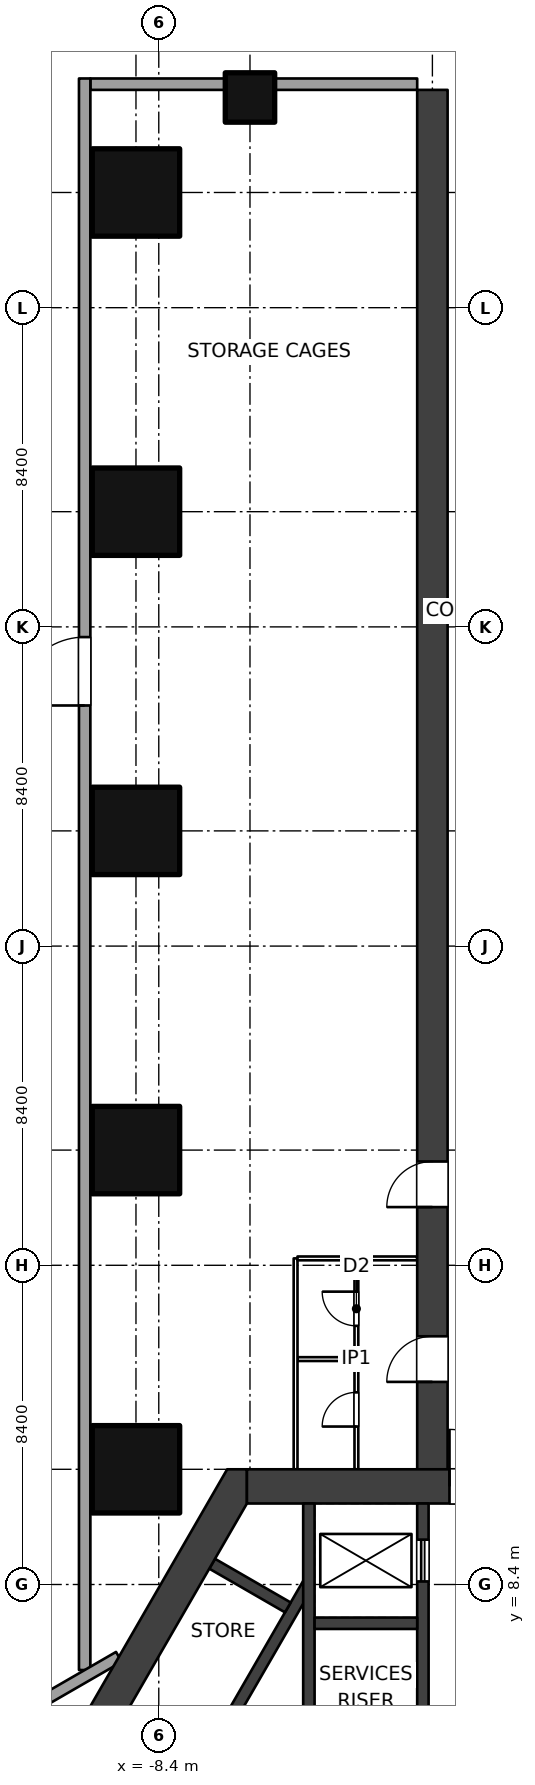
"""IFC4 building model, lengths in metres.
Left out: names, types, materials, properties, quantities, classifications, styles, units other than length and angle.
Written with IfcOpenShell. Run it as: python <this file> out.ifc"""

import sys

from ifc_helpers import new_model, si_unit, direction, frame, frame_2d, origin, origin_2d, place, context, subcontext, project, spatial, polyline, rectangle, outline, extrude, element, fill, save


model = new_model("IFC4")
c1 = context("Model", 3, precision=1e-05, world=origin(), true_north=direction((0.0, 1.0)))
c2 = subcontext(c1, "Body", "Model", "MODEL_VIEW")
j1 = project(units=[si_unit("LENGTHUNIT", "METRE"), si_unit("PLANEANGLEUNIT", "RADIAN")], contexts=[c1])
p1 = place(None, origin())
s1 = spatial("IfcSite", under=j1, at=p1, CompositionType="ELEMENT")
p2 = place(p1, origin())
s2 = spatial("IfcBuilding", under=s1, at=p2, CompositionType="ELEMENT")
p3 = place(p2, frame((0.0, 0.0, -7.0)))
s3 = spatial("IfcBuildingStorey", under=s2, at=p3, CompositionType="ELEMENT", Elevation=-7.0)
for number, where, z_axis, x_axis in (
    (1, (-9.0, 11.432, 0.0), (0.0, 0.0, 1.0), (1.0, 0.0, 0.0)),
    (2, (-9.0, 19.832, 0.0), (0.0, 0.0, 1.0), (1.0, 0.0, 0.0)),
    (3, (-9.0, 28.231, 0.0), (0.0, 0.0, 1.0), (1.0, 0.0, 0.0)),
    (4, (-9.0, 36.632, 0.0), (0.0, 0.0, 1.0), (1.0, 0.0, 0.0)),
    (5, (-9.0, 45.031, 0.0), (0.0, 0.0, 1.0), (1.0, 0.0, 0.0)),
):
    element("IfcColumn", number, at=place(p3, frame(where, z_axis=z_axis, x_axis=x_axis)), inside=s3, PredefinedType="COLUMN", context=c2, shape_type="SweptSolid", body=[
        extrude(rectangle(XDim=2.3, YDim=2.3, at=origin_2d()), origin(), (0.0, 0.0, 1.0), 3.5),
    ])
p4 = place(p3, frame((-6.0, 47.531, 0.0), z_axis=(0.0, 0.0, 1.0), x_axis=(1.0, 0.0, 0.0)))
e6 = element("IfcColumn", 6, at=p4, inside=s3, PredefinedType="COLUMN", context=c2, shape_type="SweptSolid", body=[
    extrude(rectangle(XDim=1.3, YDim=1.3, at=origin_2d()), origin(), (0.0, 0.0, 1.0), 3.5),
])
p5 = place(p3, frame((-6.08, 10.981, 0.0), z_axis=(0.0, 0.0, 1.0), x_axis=(1.0, 0.0, 0.0)))
e7 = element("IfcWall", 7, at=p5, inside=s3, PredefinedType="SHEAR", context=c2, shape_type="SweptSolid", body=[
    extrude(rectangle(XDim=12.161, YDim=0.9, at=frame_2d((6.08, 0.0))), origin(), (0.0, 0.0, 1.0), 3.5),
])
p6 = place(p5, frame((5.33, 0.0, 0.0)))
e8 = element("IfcOpeningElement", 8, at=p6, cuts=e7, PredefinedType="OPENING", context=c2, shape_type="SweptSolid", body=[
    extrude(rectangle(XDim=1.5, YDim=2.1, at=frame_2d((0.75, 1.05))), frame((0.0, 0.46, 0.0), z_axis=(0.0, -1.0, 0.0), x_axis=(1.0, 0.0, 0.0)), (0.0, 0.0, 1.0), 0.92),
])
p7 = place(p3, origin())
e9 = element("IfcWall", 9, at=p7, inside=s3, PredefinedType="SHEAR", context=c2, shape_type="SweptSolid", body=[
    extrude(outline(polyline([(-6.6, 11.432), (-13.2, 0.0), (-12.94, -0.45), (-12.161, 0.0), (-6.08, 10.531), (-6.08, 11.432), (-6.6, 11.432)])), origin(), (0.0, 0.0, 1.0), 3.5),
])
p8 = place(p3, frame((-1.45, 3.63, 0.0), z_axis=(0.0, 0.0, 1.0), x_axis=(0.0, 1.0, 0.0)))
e10 = element("IfcWall", 10, at=p8, inside=s3, PredefinedType="SHEAR", context=c2, shape_type="SweptSolid", body=[
    extrude(rectangle(XDim=6.902, YDim=0.3, at=frame_2d((3.451, 0.0))), origin(), (0.0, 0.0, 1.0), 3.5),
])
p9 = place(p8, frame((4.85, 0.0, 0.0)))
e11 = element("IfcOpeningElement", 11, at=p9, cuts=e10, PredefinedType="OPENING", context=c2, shape_type="SweptSolid", body=[
    extrude(rectangle(XDim=1.1, YDim=2.1, at=frame_2d((0.55, 1.05))), frame((0.0, 0.16, 0.0), z_axis=(0.0, -1.0, 0.0), x_axis=(1.0, 0.0, 0.0)), (0.0, 0.0, 1.0), 0.32),
])
p10 = place(p3, frame((-4.45, 3.63, 0.0), z_axis=(0.0, 0.0, 1.0), x_axis=(0.0, 1.0, 0.0)))
e12 = element("IfcWall", 12, at=p10, inside=s3, PredefinedType="SHEAR", context=c2, shape_type="SweptSolid", body=[
    extrude(rectangle(XDim=6.902, YDim=0.3, at=frame_2d((3.451, 0.0))), origin(), (0.0, 0.0, 1.0), 3.5),
])
p11 = place(p3, frame((-4.3, 7.38, 0.0), z_axis=(0.0, 0.0, 1.0), x_axis=(1.0, 0.0, 0.0)))
e13 = element("IfcWall", 13, at=p11, inside=s3, PredefinedType="SHEAR", context=c2, shape_type="SweptSolid", body=[
    extrude(rectangle(XDim=2.7, YDim=0.3, at=frame_2d((1.35, 0.0))), origin(), (0.0, 0.0, 1.0), 3.5),
])
p12 = place(p3, frame((-9.548, -0.374, 0.0), z_axis=(0.0, 0.0, 1.0), x_axis=(0.500002290144, 0.866024081565, 0.0)))
e14 = element("IfcWall", 14, at=p12, inside=s3, PredefinedType="SHEAR", context=c2, shape_type="SweptSolid", body=[
    extrude(rectangle(XDim=10.195, YDim=0.3, at=frame_2d((5.098, 0.0))), origin(), (0.0, 0.0, 1.0), 3.5),
])
p13 = place(p12, frame((4.648, 0.0, 0.0)))
e15 = element("IfcOpeningElement", 15, at=p13, cuts=e14, PredefinedType="OPENING", context=c2, shape_type="SweptSolid", body=[
    extrude(rectangle(XDim=0.9, YDim=2.1, at=frame_2d((0.45, 1.05))), frame((0.0, 0.16, 0.0), z_axis=(0.0, -1.0, 0.0), x_axis=(1.0, 0.0, 0.0)), (0.0, 0.0, 1.0), 0.32),
])
p14 = place(p3, frame((-5.004, 7.796, 0.0), z_axis=(0.0, 0.0, 1.0), x_axis=(-0.866053019151, 0.499952165731, 0.0)))
e16 = element("IfcWall", 16, at=p14, inside=s3, PredefinedType="SHEAR", context=c2, shape_type="SweptSolid", body=[
    extrude(rectangle(XDim=2.3, YDim=0.3, at=frame_2d((1.15, 0.0))), origin(), (0.0, 0.0, 1.0), 3.5),
])
p15 = place(p3, frame((-1.2, 10.981, 0.0), z_axis=(0.0, 0.0, 1.0), x_axis=(0.0, 1.0, 0.0)))
e17 = element("IfcWall", 17, at=p15, inside=s3, PredefinedType="SHEAR", context=c2, shape_type="SweptSolid", body=[
    extrude(rectangle(XDim=36.75, YDim=0.8, at=frame_2d((18.375, 0.0))), origin(), (0.0, 0.0, 1.0), 3.5),
])
p16 = place(p15, frame((2.75, 0.0, 0.0)))
e18 = element("IfcOpeningElement", 18, at=p16, cuts=e17, PredefinedType="OPENING", context=c2, shape_type="SweptSolid", body=[
    extrude(rectangle(XDim=1.2, YDim=2.1, at=frame_2d((0.6, 1.05))), frame((0.0, 0.41, 0.0), z_axis=(0.0, -1.0, 0.0), x_axis=(1.0, 0.0, 0.0)), (0.0, 0.0, 1.0), 0.82),
])
p17 = place(p15, frame((7.35, 0.0, 0.0)))
e19 = element("IfcOpeningElement", 19, at=p17, cuts=e17, PredefinedType="OPENING", context=c2, shape_type="SweptSolid", body=[
    extrude(rectangle(XDim=1.2, YDim=2.1, at=frame_2d((0.6, 1.05))), frame((0.0, 0.41, 0.0), z_axis=(0.0, -1.0, 0.0), x_axis=(1.0, 0.0, 0.0)), (0.0, 0.0, 1.0), 0.82),
])
p18 = place(p3, frame((-3.2, 11.432, 0.0), z_axis=(0.0, 0.0, 1.0), x_axis=(0.0, 1.0, 0.0)))
e20 = element("IfcWall", 20, at=p18, inside=s3, PredefinedType="PARTITIONING", context=c2, shape_type="SweptSolid", body=[
    extrude(rectangle(XDim=5.6, YDim=0.1, at=frame_2d((2.8, 0.0))), origin(), (0.0, 0.0, 1.0), 3.2),
])
p19 = place(p18, frame((1.125, 0.0, 0.0)))
e21 = element("IfcOpeningElement", 21, at=p19, cuts=e20, PredefinedType="OPENING", context=c2, shape_type="SweptSolid", body=[
    extrude(rectangle(XDim=0.9, YDim=2.1, at=frame_2d((0.45, 1.05))), frame((0.0, 0.06, 0.0), z_axis=(0.0, -1.0, 0.0), x_axis=(1.0, 0.0, 0.0)), (0.0, 0.0, 1.0), 0.12),
])
p20 = place(p18, frame((3.775, 0.0, 0.0)))
e22 = element("IfcOpeningElement", 22, at=p20, cuts=e20, PredefinedType="OPENING", context=c2, shape_type="SweptSolid", body=[
    extrude(rectangle(XDim=0.9, YDim=2.1, at=frame_2d((0.45, 1.05))), frame((0.0, 0.06, 0.0), z_axis=(0.0, -1.0, 0.0), x_axis=(1.0, 0.0, 0.0)), (0.0, 0.0, 1.0), 0.12),
])
p21 = place(p3, frame((-3.25, 14.332, 0.0), z_axis=(0.0, 0.0, 1.0), x_axis=(-1.0, 0.0, 0.0)))
e23 = element("IfcWall", 23, at=p21, inside=s3, PredefinedType="PARTITIONING", context=c2, shape_type="SweptSolid", body=[
    extrude(rectangle(XDim=1.5, YDim=0.1, at=frame_2d((0.75, 0.0))), origin(), (0.0, 0.0, 1.0), 3.2),
])
p22 = place(p3, frame((-4.8, 11.432, 0.0), z_axis=(0.0, 0.0, 1.0), x_axis=(0.0, 1.0, 0.0)))
e24 = element("IfcWall", 24, at=p22, inside=s3, PredefinedType="PARTITIONING", context=c2, shape_type="SweptSolid", body=[
    extrude(rectangle(XDim=5.55, YDim=0.1, at=frame_2d((2.775, 0.0))), origin(), (0.0, 0.0, 1.0), 3.2),
])
p23 = place(p3, frame((-1.6, 16.981, 0.0), z_axis=(0.0, 0.0, 1.0), x_axis=(-1.0, 0.0, 0.0)))
e25 = element("IfcWall", 25, at=p23, inside=s3, PredefinedType="PARTITIONING", context=c2, shape_type="SweptSolid", body=[
    extrude(rectangle(XDim=3.15, YDim=0.1, at=frame_2d((1.575, 0.0))), origin(), (0.0, 0.0, 1.0), 3.2),
])
p24 = place(p3, frame((-1.6, 47.882, 0.0), z_axis=(0.0, 0.0, 1.0), x_axis=(-1.0, 0.0, 0.0)))
e26 = element("IfcWall", 26, at=p24, inside=s3, PredefinedType="SOLIDWALL", context=c2, shape_type="SweptSolid", body=[
    extrude(rectangle(XDim=8.6, YDim=0.3, at=frame_2d((4.3, 0.0))), origin(), (0.0, 0.0, 1.0), 1.9),
])
p25 = place(p3, frame((-10.35, 6.149, 0.0), z_axis=(0.0, 0.0, 1.0), x_axis=(0.0, 1.0, 0.0)))
e27 = element("IfcWall", 27, at=p25, inside=s3, PredefinedType="SOLIDWALL", context=c2, shape_type="SweptSolid", body=[
    extrude(rectangle(XDim=41.883, YDim=0.3, at=frame_2d((20.941, 0.0))), origin(), (0.0, 0.0, 1.0), 3.2),
])
p26 = place(p25, frame((25.383, 0.0, 0.0)))
e28 = element("IfcOpeningElement", 28, at=p26, cuts=e27, PredefinedType="OPENING", context=c2, shape_type="SweptSolid", body=[
    extrude(rectangle(XDim=1.8, YDim=2.4, at=frame_2d((0.9, 1.2))), frame((0.0, 0.16, 0.0), z_axis=(0.0, -1.0, 0.0), x_axis=(1.0, 0.0, 0.0)), (0.0, 0.0, 1.0), 0.32),
])
p27 = place(p3, frame((-9.45, 6.495, 0.0), z_axis=(0.0, 0.0, 1.0), x_axis=(-0.866025301493, -0.500000177174, 0.0)))
e29 = element("IfcWall", 29, at=p27, inside=s3, PredefinedType="SOLIDWALL", context=c2, shape_type="SweptSolid", body=[
    extrude(rectangle(XDim=43.095, YDim=0.3, at=frame_2d((21.548, 0.0))), origin(), (0.0, 0.0, 1.0), 3.2),
])
p28 = place(p27, frame((26.595, 0.0, 0.0)))
e30 = element("IfcOpeningElement", 30, at=p28, cuts=e29, PredefinedType="OPENING", context=c2, shape_type="SweptSolid", body=[
    extrude(rectangle(XDim=1.8, YDim=2.4, at=frame_2d((0.9, 1.2))), frame((0.0, 0.16, 0.0), z_axis=(0.0, -1.0, 0.0), x_axis=(1.0, 0.0, 0.0)), (0.0, 0.0, 1.0), 0.32),
])
p29 = place(p9, origin())
e31 = element("IfcDoor", 31, at=p29, inside=s3, OperationType="DOUBLE_DOOR_SLIDING", PredefinedType="DOOR", context=c2, shape_type="SweptSolid", body=[
    extrude(rectangle(XDim=1.1, YDim=2.1, at=frame_2d((0.55, 1.05))), frame((0.0, 0.025, 0.0), z_axis=(0.0, -1.0, 0.0), x_axis=(1.0, 0.0, 0.0)), (0.0, 0.0, 1.0), 0.05),
])
fill(e11, e31)
p30 = place(p6, origin())
e32 = element("IfcDoor", 32, at=p30, inside=s3, OperationType="DOUBLE_DOOR_DOUBLE_SWING", PredefinedType="DOOR", context=c2, shape_type="SweptSolid", body=[
    extrude(rectangle(XDim=1.5, YDim=2.1, at=frame_2d((0.75, 1.05))), frame((0.0, 0.025, 0.0), z_axis=(0.0, -1.0, 0.0), x_axis=(1.0, 0.0, 0.0)), (0.0, 0.0, 1.0), 0.05),
])
fill(e8, e32)
p31 = place(p19, origin())
e33 = element("IfcDoor", 33, at=p31, inside=s3, OperationType="SINGLE_SWING_LEFT", PredefinedType="DOOR", context=c2, shape_type="SweptSolid", body=[
    extrude(rectangle(XDim=0.9, YDim=2.1, at=frame_2d((0.45, 1.05))), frame((0.0, 0.025, 0.0), z_axis=(0.0, -1.0, 0.0), x_axis=(1.0, 0.0, 0.0)), (0.0, 0.0, 1.0), 0.05),
])
fill(e21, e33)
p32 = place(p20, origin())
e34 = element("IfcDoor", 34, at=p32, inside=s3, OperationType="SINGLE_SWING_RIGHT", PredefinedType="DOOR", context=c2, shape_type="SweptSolid", body=[
    extrude(rectangle(XDim=0.9, YDim=2.1, at=frame_2d((0.45, 1.05))), frame((0.0, 0.025, 0.0), z_axis=(0.0, -1.0, 0.0), x_axis=(1.0, 0.0, 0.0)), (0.0, 0.0, 1.0), 0.05),
])
fill(e22, e34)
p33 = place(p16, origin())
e35 = element("IfcDoor", 35, at=p33, inside=s3, OperationType="DOUBLE_SWING_LEFT", PredefinedType="DOOR", context=c2, shape_type="SweptSolid", body=[
    extrude(rectangle(XDim=1.2, YDim=2.1, at=frame_2d((0.6, 1.05))), frame((0.0, 0.025, 0.0), z_axis=(0.0, -1.0, 0.0), x_axis=(1.0, 0.0, 0.0)), (0.0, 0.0, 1.0), 0.05),
])
fill(e18, e35)
p34 = place(p17, origin())
e36 = element("IfcDoor", 36, at=p34, inside=s3, OperationType="DOUBLE_SWING_LEFT", PredefinedType="DOOR", context=c2, shape_type="SweptSolid", body=[
    extrude(rectangle(XDim=1.2, YDim=2.1, at=frame_2d((0.6, 1.05))), frame((0.0, 0.025, 0.0), z_axis=(0.0, -1.0, 0.0), x_axis=(1.0, 0.0, 0.0)), (0.0, 0.0, 1.0), 0.05),
])
fill(e19, e36)
p35 = place(p26, origin())
e37 = element("IfcDoor", 37, at=p35, inside=s3, OperationType="DOUBLE_DOOR_DOUBLE_SWING", PredefinedType="DOOR", context=c2, shape_type="SweptSolid", body=[
    extrude(rectangle(XDim=1.8, YDim=2.4, at=frame_2d((0.9, 1.2))), frame((0.0, 0.025, 0.0), z_axis=(0.0, -1.0, 0.0), x_axis=(1.0, 0.0, 0.0)), (0.0, 0.0, 1.0), 0.05),
])
fill(e28, e37)
save(model, sys.argv[1])
